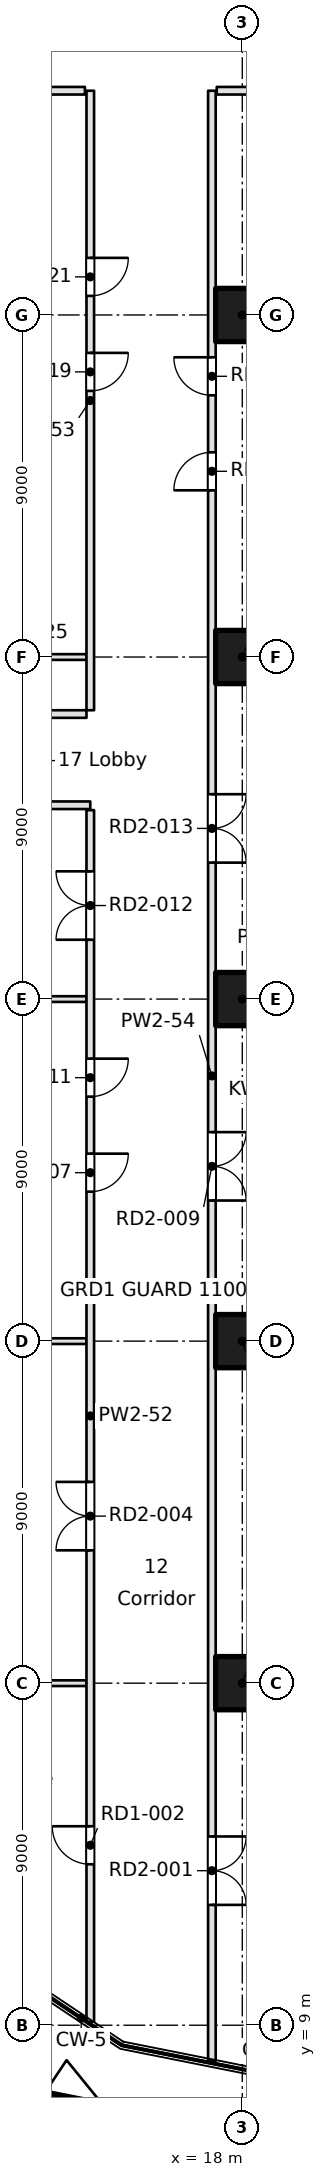
"""IFC4 building model, lengths in metres.
Left out: names, types, materials, properties, quantities, classifications, styles, units other than length and angle.
Written with IfcOpenShell. Run it as: python <this file> out.ifc"""

import sys

from ifc_helpers import new_model, si_unit, direction, frame, frame_2d, origin, origin_2d, place, context, subcontext, project, spatial, rectangle, extrude, element, fill, save


model = new_model("IFC4")
c1 = context("Model", 3, precision=1e-05, world=origin(), true_north=direction((0.0, 1.0)))
c2 = subcontext(c1, "Body", "Model", "MODEL_VIEW")
j1 = project(units=[si_unit("LENGTHUNIT", "METRE"), si_unit("PLANEANGLEUNIT", "RADIAN")], contexts=[c1])
p1 = place(None, origin())
s1 = spatial("IfcSite", under=j1, at=p1, CompositionType="ELEMENT")
p2 = place(p1, origin())
s2 = spatial("IfcBuilding", under=s1, at=p2, CompositionType="ELEMENT")
p3 = place(p2, frame((0.0, 0.0, 65.4)))
s3 = spatial("IfcBuildingStorey", under=s2, at=p3, CompositionType="ELEMENT", Elevation=65.4)
p4 = place(p3, frame((13.89, 6.213, 0.0), z_axis=(0.0, 0.0, 1.0), x_axis=(-0.980785280403, 0.195090322016, 0.0)))
e1 = element("IfcColumn", 1, at=p4, inside=s3, PredefinedType="COLUMN", context=c2, shape_type="SweptSolid", body=[
    extrude(rectangle(XDim=2.4, YDim=1.6, at=origin_2d()), origin(), (0.0, 0.0, 1.0), 3.7),
])
for number, where, z_axis, x_axis in (
    (2, (18.0, 18.0, 0.0), (0.0, 0.0, 1.0), (1.0, 0.0, 0.0)),
    (3, (18.0, 27.0, 0.0), (0.0, 0.0, 1.0), (1.0, 0.0, 0.0)),
    (4, (18.0, 36.0, 0.0), (0.0, 0.0, 1.0), (1.0, 0.0, 0.0)),
    (5, (18.0, 45.0, 0.0), (0.0, 0.0, 1.0), (1.0, 0.0, 0.0)),
    (6, (18.0, 54.0, 0.0), (0.0, 0.0, 1.0), (1.0, 0.0, 0.0)),
):
    element("IfcColumn", number, at=place(p3, frame(where, z_axis=z_axis, x_axis=x_axis)), inside=s3, PredefinedType="COLUMN", context=c2, shape_type="SweptSolid", body=[
        extrude(rectangle(XDim=1.4, YDim=1.4, at=origin_2d()), origin(), (0.0, 0.0, 1.0), 3.7),
    ])
for number, where, z_axis, x_axis in (
    (7, (9.7, 18.0, 0.0), (0.0, 0.0, 1.0), (1.0, 0.0, 0.0)),
    (8, (9.7, 27.0, 0.0), (0.0, 0.0, 1.0), (1.0, 0.0, 0.0)),
    (9, (9.7, 36.0, 0.0), (0.0, 0.0, 1.0), (1.0, 0.0, 0.0)),
):
    element("IfcWall", number, at=place(p3, frame(where, z_axis=z_axis, x_axis=x_axis)), inside=s3, PredefinedType="PARTITIONING", context=c2, shape_type="SweptSolid", body=[
        extrude(rectangle(XDim=4.2, YDim=0.15, at=frame_2d((2.1, 0.0))), origin(), (0.0, 0.0, 1.0), 3.3),
    ])
p5 = place(p3, frame((14.0, 41.1, 0.0), z_axis=(0.0, 0.0, 1.0), x_axis=(-1.0, 0.0, 0.0)))
e10 = element("IfcWall", 10, at=p5, inside=s3, PredefinedType="PARTITIONING", context=c2, shape_type="SweptSolid", body=[
    extrude(rectangle(XDim=4.925, YDim=0.2, at=frame_2d((2.462, 0.0))), origin(), (0.0, 0.0, 1.0), 3.3),
])
p6 = place(p3, frame((6.1, 43.5, 0.0), z_axis=(0.0, 0.0, 1.0), x_axis=(1.0, 0.0, 0.0)))
e11 = element("IfcWall", 11, at=p6, inside=s3, PredefinedType="PARTITIONING", context=c2, shape_type="SweptSolid", body=[
    extrude(rectangle(XDim=7.8, YDim=0.2, at=frame_2d((3.9, 0.0))), origin(), (0.0, 0.0, 1.0), 3.3),
])
p7 = place(p6, frame((4.5, 0.0, 0.0)))
e12 = element("IfcOpeningElement", 12, at=p7, cuts=e11, PredefinedType="OPENING", context=c2, shape_type="SweptSolid", body=[
    extrude(rectangle(XDim=1.8, YDim=2.1, at=frame_2d((0.9, 1.05))), frame((0.0, 0.1, 0.0), z_axis=(0.0, -1.0, 0.0), x_axis=(1.0, 0.0, 0.0)), (0.0, 0.0, 1.0), 0.2),
])
p8 = place(p3, frame((9.7, 45.0, 0.0), z_axis=(0.0, 0.0, 1.0), x_axis=(1.0, 0.0, 0.0)))
e13 = element("IfcWall", 13, at=p8, inside=s3, PredefinedType="PARTITIONING", context=c2, shape_type="SweptSolid", body=[
    extrude(rectangle(XDim=4.2, YDim=0.15, at=frame_2d((2.1, 0.0))), origin(), (0.0, 0.0, 1.0), 3.3),
])
p9 = place(p3, frame((13.859, 59.9, 0.0), z_axis=(0.0, 0.0, 1.0), x_axis=(-1.0, 0.0, 0.0)))
e14 = element("IfcWall", 14, at=p9, inside=s3, PredefinedType="PARTITIONING", context=c2, shape_type="SweptSolid", body=[
    extrude(rectangle(XDim=4.955, YDim=0.2, at=frame_2d((2.478, 0.0))), origin(), (0.0, 0.0, 1.0), 3.3),
])
p10 = place(p3, frame((29.4, 59.9, 0.0), z_axis=(0.0, 0.0, 1.0), x_axis=(-1.0, 0.0, 0.0)))
e15 = element("IfcWall", 15, at=p10, inside=s3, PredefinedType="PARTITIONING", context=c2, shape_type="SweptSolid", body=[
    extrude(rectangle(XDim=12.072, YDim=0.2, at=frame_2d((6.036, 0.0))), origin(), (0.0, 0.0, 1.0), 3.3),
])
p11 = place(p3, frame((14.0, 9.092, 0.0), z_axis=(0.0, 0.0, 1.0), x_axis=(0.0, 1.0, 0.0)))
e16 = element("IfcWall", 16, at=p11, inside=s3, PredefinedType="PARTITIONING", context=c2, shape_type="SweptSolid", body=[
    extrude(rectangle(XDim=31.88, YDim=0.2, at=frame_2d((15.94, 0.0))), origin(), (0.0, 0.0, 1.0), 3.3),
])
p12 = place(p11, frame((4.144, 0.0, 0.0)))
e17 = element("IfcOpeningElement", 17, at=p12, cuts=e16, PredefinedType="OPENING", context=c2, shape_type="SweptSolid", body=[
    extrude(rectangle(XDim=1.0, YDim=2.1, at=frame_2d((0.5, 1.05))), frame((0.0, 0.1, 0.0), z_axis=(0.0, -1.0, 0.0), x_axis=(1.0, 0.0, 0.0)), (0.0, 0.0, 1.0), 0.2),
])
p13 = place(p11, frame((12.404, 0.0, 0.0)))
e18 = element("IfcOpeningElement", 18, at=p13, cuts=e16, PredefinedType="OPENING", context=c2, shape_type="SweptSolid", body=[
    extrude(rectangle(XDim=1.8, YDim=2.1, at=frame_2d((0.9, 1.05))), frame((0.0, 0.1, 0.0), z_axis=(0.0, -1.0, 0.0), x_axis=(1.0, 0.0, 0.0)), (0.0, 0.0, 1.0), 0.2),
])
p14 = place(p11, frame((21.841, 0.0, 0.0)))
e19 = element("IfcOpeningElement", 19, at=p14, cuts=e16, PredefinedType="OPENING", context=c2, shape_type="SweptSolid", body=[
    extrude(rectangle(XDim=1.0, YDim=2.1, at=frame_2d((0.5, 1.05))), frame((0.0, 0.1, 0.0), z_axis=(0.0, -1.0, 0.0), x_axis=(1.0, 0.0, 0.0)), (0.0, 0.0, 1.0), 0.2),
])
p15 = place(p11, frame((24.341, 0.0, 0.0)))
e20 = element("IfcOpeningElement", 20, at=p15, cuts=e16, PredefinedType="OPENING", context=c2, shape_type="SweptSolid", body=[
    extrude(rectangle(XDim=1.0, YDim=2.1, at=frame_2d((0.5, 1.05))), frame((0.0, 0.1, 0.0), z_axis=(0.0, -1.0, 0.0), x_axis=(1.0, 0.0, 0.0)), (0.0, 0.0, 1.0), 0.2),
])
p16 = place(p11, frame((28.469, 0.0, 0.0)))
e21 = element("IfcOpeningElement", 21, at=p16, cuts=e16, PredefinedType="OPENING", context=c2, shape_type="SweptSolid", body=[
    extrude(rectangle(XDim=1.8, YDim=2.1, at=frame_2d((0.9, 1.05))), frame((0.0, 0.1, 0.0), z_axis=(0.0, -1.0, 0.0), x_axis=(1.0, 0.0, 0.0)), (0.0, 0.0, 1.0), 0.2),
])
p17 = place(p3, frame((14.0, 43.6, 0.0), z_axis=(0.0, 0.0, 1.0), x_axis=(0.0, 1.0, 0.0)))
e22 = element("IfcWall", 22, at=p17, inside=s3, PredefinedType="PARTITIONING", context=c2, shape_type="SweptSolid", body=[
    extrude(rectangle(XDim=16.3, YDim=0.2, at=frame_2d((8.15, 0.0))), origin(), (0.0, 0.0, 1.0), 3.3),
])
p18 = place(p17, frame((8.402, 0.0, 0.0)))
e23 = element("IfcOpeningElement", 23, at=p18, cuts=e22, PredefinedType="OPENING", context=c2, shape_type="SweptSolid", body=[
    extrude(rectangle(XDim=1.0, YDim=2.1, at=frame_2d((0.5, 1.05))), frame((0.0, 0.1, 0.0), z_axis=(0.0, -1.0, 0.0), x_axis=(1.0, 0.0, 0.0)), (0.0, 0.0, 1.0), 0.2),
])
p19 = place(p17, frame((10.902, 0.0, 0.0)))
e24 = element("IfcOpeningElement", 24, at=p19, cuts=e22, PredefinedType="OPENING", context=c2, shape_type="SweptSolid", body=[
    extrude(rectangle(XDim=1.0, YDim=2.1, at=frame_2d((0.5, 1.05))), frame((0.0, 0.1, 0.0), z_axis=(0.0, -1.0, 0.0), x_axis=(1.0, 0.0, 0.0)), (0.0, 0.0, 1.0), 0.2),
])
p20 = place(p3, frame((17.2, 59.9, 0.0), z_axis=(0.0, 0.0, 1.0), x_axis=(0.0, -1.0, 0.0)))
e25 = element("IfcWall", 25, at=p20, inside=s3, PredefinedType="PARTITIONING", context=c2, shape_type="SweptSolid", body=[
    extrude(rectangle(XDim=51.843, YDim=0.2, at=frame_2d((25.921, 0.0))), origin(), (0.0, 0.0, 1.0), 3.3),
])
p21 = place(p20, frame((45.934, 0.0, 0.0)))
e26 = element("IfcOpeningElement", 26, at=p21, cuts=e25, PredefinedType="OPENING", context=c2, shape_type="SweptSolid", body=[
    extrude(rectangle(XDim=1.8, YDim=2.1, at=frame_2d((0.9, 1.05))), frame((0.0, 0.1, 0.0), z_axis=(0.0, -1.0, 0.0), x_axis=(1.0, 0.0, 0.0)), (0.0, 0.0, 1.0), 0.2),
])
p22 = place(p20, frame((27.401, 0.0, 0.0)))
e27 = element("IfcOpeningElement", 27, at=p22, cuts=e25, PredefinedType="OPENING", context=c2, shape_type="SweptSolid", body=[
    extrude(rectangle(XDim=1.8, YDim=2.1, at=frame_2d((0.9, 1.05))), frame((0.0, 0.1, 0.0), z_axis=(0.0, -1.0, 0.0), x_axis=(1.0, 0.0, 0.0)), (0.0, 0.0, 1.0), 0.2),
])
p23 = place(p20, frame((18.51, 0.0, 0.0)))
e28 = element("IfcOpeningElement", 28, at=p23, cuts=e25, PredefinedType="OPENING", context=c2, shape_type="SweptSolid", body=[
    extrude(rectangle(XDim=1.8, YDim=2.1, at=frame_2d((0.9, 1.05))), frame((0.0, 0.1, 0.0), z_axis=(0.0, -1.0, 0.0), x_axis=(1.0, 0.0, 0.0)), (0.0, 0.0, 1.0), 0.2),
])
p24 = place(p20, frame((9.513, 0.0, 0.0)))
e29 = element("IfcOpeningElement", 29, at=p24, cuts=e25, PredefinedType="OPENING", context=c2, shape_type="SweptSolid", body=[
    extrude(rectangle(XDim=1.0, YDim=2.1, at=frame_2d((0.5, 1.05))), frame((0.0, 0.1, 0.0), z_axis=(0.0, -1.0, 0.0), x_axis=(1.0, 0.0, 0.0)), (0.0, 0.0, 1.0), 0.2),
])
p25 = place(p20, frame((7.013, 0.0, 0.0)))
e30 = element("IfcOpeningElement", 30, at=p25, cuts=e25, PredefinedType="OPENING", context=c2, shape_type="SweptSolid", body=[
    extrude(rectangle(XDim=1.0, YDim=2.1, at=frame_2d((0.5, 1.05))), frame((0.0, 0.1, 0.0), z_axis=(0.0, -1.0, 0.0), x_axis=(1.0, 0.0, 0.0)), (0.0, 0.0, 1.0), 0.2),
])
p26 = place(p21, origin())
e31 = element("IfcDoor", 31, at=p26, inside=s3, OperationType="DOUBLE_DOOR_SINGLE_SWING", PredefinedType="DOOR", context=c2, shape_type="SweptSolid", body=[
    extrude(rectangle(XDim=1.8, YDim=2.1, at=frame_2d((0.9, 1.05))), frame((0.0, 0.025, 0.0), z_axis=(0.0, -1.0, 0.0), x_axis=(1.0, 0.0, 0.0)), (0.0, 0.0, 1.0), 0.05),
])
fill(e26, e31)
p27 = place(p12, origin())
e32 = element("IfcDoor", 32, at=p27, inside=s3, OperationType="SINGLE_SWING_RIGHT", PredefinedType="DOOR", context=c2, shape_type="SweptSolid", body=[
    extrude(rectangle(XDim=1.0, YDim=2.1, at=frame_2d((0.5, 1.05))), frame((0.0, 0.025, 0.0), z_axis=(0.0, -1.0, 0.0), x_axis=(1.0, 0.0, 0.0)), (0.0, 0.0, 1.0), 0.05),
])
fill(e17, e32)
p28 = place(p13, origin())
e33 = element("IfcDoor", 33, at=p28, inside=s3, OperationType="DOUBLE_DOOR_SINGLE_SWING", PredefinedType="DOOR", context=c2, shape_type="SweptSolid", body=[
    extrude(rectangle(XDim=1.8, YDim=2.1, at=frame_2d((0.9, 1.05))), frame((0.0, 0.025, 0.0), z_axis=(0.0, -1.0, 0.0), x_axis=(1.0, 0.0, 0.0)), (0.0, 0.0, 1.0), 0.05),
])
fill(e18, e33)
p29 = place(p14, frame((1.0, 0.0, 0.0), z_axis=(0.0, 0.0, 1.0), x_axis=(-1.0, 0.0, 0.0)))
e34 = element("IfcDoor", 34, at=p29, inside=s3, OperationType="SINGLE_SWING_LEFT", PredefinedType="DOOR", context=c2, shape_type="SweptSolid", body=[
    extrude(rectangle(XDim=1.0, YDim=2.1, at=frame_2d((0.5, 1.05))), frame((0.0, 0.025, 0.0), z_axis=(0.0, -1.0, 0.0), x_axis=(1.0, 0.0, 0.0)), (0.0, 0.0, 1.0), 0.05),
])
fill(e19, e34)
p30 = place(p22, origin())
e35 = element("IfcDoor", 35, at=p30, inside=s3, OperationType="DOUBLE_DOOR_SINGLE_SWING", PredefinedType="DOOR", context=c2, shape_type="SweptSolid", body=[
    extrude(rectangle(XDim=1.8, YDim=2.1, at=frame_2d((0.9, 1.05))), frame((0.0, 0.025, 0.0), z_axis=(0.0, -1.0, 0.0), x_axis=(1.0, 0.0, 0.0)), (0.0, 0.0, 1.0), 0.05),
])
fill(e27, e35)
p31 = place(p15, frame((1.0, 0.0, 0.0), z_axis=(0.0, 0.0, 1.0), x_axis=(-1.0, 0.0, 0.0)))
e36 = element("IfcDoor", 36, at=p31, inside=s3, OperationType="SINGLE_SWING_LEFT", PredefinedType="DOOR", context=c2, shape_type="SweptSolid", body=[
    extrude(rectangle(XDim=1.0, YDim=2.1, at=frame_2d((0.5, 1.05))), frame((0.0, 0.025, 0.0), z_axis=(0.0, -1.0, 0.0), x_axis=(1.0, 0.0, 0.0)), (0.0, 0.0, 1.0), 0.05),
])
fill(e20, e36)
p32 = place(p16, origin())
e37 = element("IfcDoor", 37, at=p32, inside=s3, OperationType="DOUBLE_DOOR_SINGLE_SWING", PredefinedType="DOOR", context=c2, shape_type="SweptSolid", body=[
    extrude(rectangle(XDim=1.8, YDim=2.1, at=frame_2d((0.9, 1.05))), frame((0.0, 0.025, 0.0), z_axis=(0.0, -1.0, 0.0), x_axis=(1.0, 0.0, 0.0)), (0.0, 0.0, 1.0), 0.05),
])
fill(e21, e37)
p33 = place(p23, origin())
e38 = element("IfcDoor", 38, at=p33, inside=s3, OperationType="DOUBLE_DOOR_SINGLE_SWING", PredefinedType="DOOR", context=c2, shape_type="SweptSolid", body=[
    extrude(rectangle(XDim=1.8, YDim=2.1, at=frame_2d((0.9, 1.05))), frame((0.0, 0.025, 0.0), z_axis=(0.0, -1.0, 0.0), x_axis=(1.0, 0.0, 0.0)), (0.0, 0.0, 1.0), 0.05),
])
fill(e28, e38)
p34 = place(p24, frame((1.0, 0.0, 0.0), z_axis=(0.0, 0.0, 1.0), x_axis=(-1.0, 0.0, 0.0)))
e39 = element("IfcDoor", 39, at=p34, inside=s3, OperationType="SINGLE_SWING_LEFT", PredefinedType="DOOR", context=c2, shape_type="SweptSolid", body=[
    extrude(rectangle(XDim=1.0, YDim=2.1, at=frame_2d((0.5, 1.05))), frame((0.0, 0.025, 0.0), z_axis=(0.0, -1.0, 0.0), x_axis=(1.0, 0.0, 0.0)), (0.0, 0.0, 1.0), 0.05),
])
fill(e29, e39)
p35 = place(p25, frame((1.0, 0.0, 0.0), z_axis=(0.0, 0.0, 1.0), x_axis=(-1.0, 0.0, 0.0)))
e40 = element("IfcDoor", 40, at=p35, inside=s3, OperationType="SINGLE_SWING_RIGHT", PredefinedType="DOOR", context=c2, shape_type="SweptSolid", body=[
    extrude(rectangle(XDim=1.0, YDim=2.1, at=frame_2d((0.5, 1.05))), frame((0.0, 0.025, 0.0), z_axis=(0.0, -1.0, 0.0), x_axis=(1.0, 0.0, 0.0)), (0.0, 0.0, 1.0), 0.05),
])
fill(e30, e40)
p36 = place(p18, frame((1.0, 0.0, 0.0), z_axis=(0.0, 0.0, 1.0), x_axis=(-1.0, 0.0, 0.0)))
e41 = element("IfcDoor", 41, at=p36, inside=s3, OperationType="SINGLE_SWING_LEFT", PredefinedType="DOOR", context=c2, shape_type="SweptSolid", body=[
    extrude(rectangle(XDim=1.0, YDim=2.1, at=frame_2d((0.5, 1.05))), frame((0.0, 0.025, 0.0), z_axis=(0.0, -1.0, 0.0), x_axis=(1.0, 0.0, 0.0)), (0.0, 0.0, 1.0), 0.05),
])
fill(e23, e41)
p37 = place(p19, frame((1.0, 0.0, 0.0), z_axis=(0.0, 0.0, 1.0), x_axis=(-1.0, 0.0, 0.0)))
e42 = element("IfcDoor", 42, at=p37, inside=s3, OperationType="SINGLE_SWING_LEFT", PredefinedType="DOOR", context=c2, shape_type="SweptSolid", body=[
    extrude(rectangle(XDim=1.0, YDim=2.1, at=frame_2d((0.5, 1.05))), frame((0.0, 0.025, 0.0), z_axis=(0.0, -1.0, 0.0), x_axis=(1.0, 0.0, 0.0)), (0.0, 0.0, 1.0), 0.05),
])
fill(e24, e42)
save(model, sys.argv[1])
